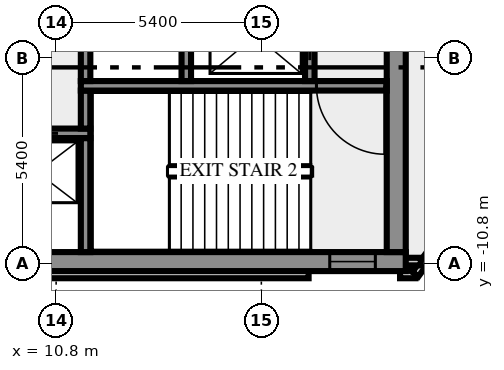
"""IFC4 building model, lengths in metres.
Left out: names, types, materials, properties, quantities, classifications, styles, units other than length and angle.
Written with IfcOpenShell. Run it as: python <this file> out.ifc"""

import sys

from ifc_helpers import new_model, si_unit, direction, frame, frame_2d, origin, place, context, subcontext, project, spatial, rectangle, extrude, element, fill, save


model = new_model("IFC4")
c1 = context("Model", 3, precision=1e-05, world=origin(), true_north=direction((0.0, 1.0)))
c2 = subcontext(c1, "Body", "Model", "MODEL_VIEW")
j1 = project(units=[si_unit("LENGTHUNIT", "METRE"), si_unit("PLANEANGLEUNIT", "RADIAN")], contexts=[c1])
p1 = place(None, origin())
s1 = spatial("IfcSite", under=j1, at=p1, CompositionType="ELEMENT")
p2 = place(p1, origin())
s2 = spatial("IfcBuilding", under=s1, at=p2, CompositionType="ELEMENT")
p3 = place(p2, frame((0.0, 0.0, 198.0)))
s3 = spatial("IfcBuildingStorey", under=s2, at=p3, CompositionType="ELEMENT", Elevation=198.0)
p4 = place(p3, frame((-17.444, -11.088, 0.0), z_axis=(0.0, 0.0, 1.0), x_axis=(1.0, 0.0, 0.0)))
e1 = element("IfcWall", 1, at=p4, inside=s3, PredefinedType="SOLIDWALL", context=c2, shape_type="SweptSolid", body=[
    extrude(rectangle(XDim=34.888, YDim=0.2, at=frame_2d((17.444, 0.0))), origin(), (0.0, 0.0, 1.0), 3.65),
])
p5 = place(p3, frame((19.85, -11.088, 0.0), z_axis=(0.0, 0.0, 1.0), x_axis=(1.0, 0.0, 0.0)))
e2 = element("IfcWall", 2, at=p5, inside=s3, PredefinedType="SOLIDWALL", context=c2, shape_type="SweptSolid", body=[
    extrude(rectangle(XDim=0.406, YDim=0.2, at=frame_2d((0.203, 0.0))), origin(), (0.0, 0.0, 1.0), 3.65),
])
p6 = place(p3, frame((20.253, -11.083, 0.0), z_axis=(0.0, 0.0, 1.0), x_axis=(0.587766567315, 0.809030569476, 0.0)))
e3 = element("IfcWall", 3, at=p6, inside=s3, PredefinedType="SOLIDWALL", context=c2, shape_type="SweptSolid", body=[
    extrude(rectangle(XDim=2.688, YDim=0.2, at=frame_2d((1.344, 0.0))), origin(), (0.0, 0.0, 1.0), 3.65),
])
p7 = place(p3, frame((19.98, -10.75, 0.0), z_axis=(0.0, 0.0, 1.0), x_axis=(1.0, 0.0, 0.0)))
e4 = element("IfcWall", 4, at=p7, inside=s3, PredefinedType="SOLIDWALL", context=c2, shape_type="SweptSolid", body=[
    extrude(rectangle(XDim=0.417, YDim=0.2, at=frame_2d((0.208, 0.0))), origin(), (0.0, 0.0, 1.0), 3.65),
])
p8 = place(p3, frame((-20.0, -10.75, 0.0), z_axis=(0.0, 0.0, 1.0), x_axis=(1.0, 0.0, 0.0)))
e5 = element("IfcWall", 5, at=p8, inside=s3, PredefinedType="SHEAR", context=c2, shape_type="SweptSolid", body=[
    extrude(rectangle(XDim=40.0, YDim=0.5, at=frame_2d((20.0, 0.0))), origin(), (0.0, 0.0, 1.0), 3.65),
])
p9 = place(p8, frame((0.8, 0.0, 1.0)))
e6 = element("IfcOpeningElement", 6, at=p9, cuts=e5, PredefinedType="OPENING", context=c2, shape_type="SweptSolid", body=[
    extrude(rectangle(XDim=1.2, YDim=1.2, at=frame_2d((0.6, 0.6))), frame((0.0, 0.26, 0.0), z_axis=(0.0, -1.0, 0.0), x_axis=(1.0, 0.0, 0.0)), (0.0, 0.0, 1.0), 0.52),
])
p10 = place(p8, frame((38.0, 0.0, 1.0)))
e7 = element("IfcOpeningElement", 7, at=p10, cuts=e5, PredefinedType="OPENING", context=c2, shape_type="SweptSolid", body=[
    extrude(rectangle(XDim=1.2, YDim=1.2, at=frame_2d((0.6, 0.6))), frame((0.0, 0.26, 0.0), z_axis=(0.0, -1.0, 0.0), x_axis=(1.0, 0.0, 0.0)), (0.0, 0.0, 1.0), 0.52),
])
p11 = place(p3, frame((11.575, -10.5, 0.0), z_axis=(0.0, 0.0, 1.0), x_axis=(0.0, 1.0, 0.0)))
e8 = element("IfcWall", 8, at=p11, inside=s3, PredefinedType="SHEAR", context=c2, shape_type="SweptSolid", body=[
    extrude(rectangle(XDim=3.0, YDim=0.25, at=frame_2d((1.5, 0.0))), origin(), (0.0, 0.0, 1.0), 3.65),
])
p12 = place(p3, frame((19.75, -10.5, 0.0), z_axis=(0.0, 0.0, 1.0), x_axis=(0.0, 1.0, 0.0)))
e9 = element("IfcWall", 9, at=p12, inside=s3, PredefinedType="SHEAR", context=c2, shape_type="SweptSolid", body=[
    extrude(rectangle(XDim=8.8, YDim=0.5, at=frame_2d((4.4, 0.0))), origin(), (0.0, 0.0, 1.0), 3.65),
])
p13 = place(p3, frame((11.7, -7.375, 0.0), z_axis=(0.0, 0.0, 1.0), x_axis=(-1.0, 0.0, 0.0)))
e10 = element("IfcWall", 10, at=p13, inside=s3, PredefinedType="SHEAR", context=c2, shape_type="SweptSolid", body=[
    extrude(rectangle(XDim=23.4, YDim=0.25, at=frame_2d((11.7, 0.0))), origin(), (0.0, 0.0, 1.0), 3.65),
])
p14 = place(p13, frame((22.012, 0.0, 0.0)))
e11 = element("IfcOpeningElement", 11, at=p14, cuts=e10, PredefinedType="OPENING", context=c2, shape_type="SweptSolid", body=[
    extrude(rectangle(XDim=0.9, YDim=2.1, at=frame_2d((0.45, 1.05))), frame((0.0, 0.135, 0.0), z_axis=(0.0, -1.0, 0.0), x_axis=(1.0, 0.0, 0.0)), (0.0, 0.0, 1.0), 0.27),
])
p15 = place(p13, frame((20.25, 0.0, 0.0)))
e12 = element("IfcOpeningElement", 12, at=p15, cuts=e10, PredefinedType="OPENING", context=c2, shape_type="SweptSolid", body=[
    extrude(rectangle(XDim=0.9, YDim=2.1, at=frame_2d((0.45, 1.05))), frame((0.0, 0.135, 0.0), z_axis=(0.0, -1.0, 0.0), x_axis=(1.0, 0.0, 0.0)), (0.0, 0.0, 1.0), 0.27),
])
p16 = place(p13, frame((18.25, 0.0, 0.0)))
e13 = element("IfcOpeningElement", 13, at=p16, cuts=e10, PredefinedType="OPENING", context=c2, shape_type="SweptSolid", body=[
    extrude(rectangle(XDim=0.9, YDim=2.1, at=frame_2d((0.45, 1.05))), frame((0.0, 0.135, 0.0), z_axis=(0.0, -1.0, 0.0), x_axis=(1.0, 0.0, 0.0)), (0.0, 0.0, 1.0), 0.27),
])
p17 = place(p13, frame((16.287, 0.0, 0.0)))
e14 = element("IfcOpeningElement", 14, at=p17, cuts=e10, PredefinedType="OPENING", context=c2, shape_type="SweptSolid", body=[
    extrude(rectangle(XDim=0.9, YDim=2.1, at=frame_2d((0.45, 1.05))), frame((0.0, 0.135, 0.0), z_axis=(0.0, -1.0, 0.0), x_axis=(1.0, 0.0, 0.0)), (0.0, 0.0, 1.0), 0.27),
])
p18 = place(p13, frame((14.25, 0.0, 0.0)))
e15 = element("IfcOpeningElement", 15, at=p18, cuts=e10, PredefinedType="OPENING", context=c2, shape_type="SweptSolid", body=[
    extrude(rectangle(XDim=0.9, YDim=2.1, at=frame_2d((0.45, 1.05))), frame((0.0, 0.135, 0.0), z_axis=(0.0, -1.0, 0.0), x_axis=(1.0, 0.0, 0.0)), (0.0, 0.0, 1.0), 0.27),
])
p19 = place(p13, frame((12.125, 0.0, 0.0)))
e16 = element("IfcOpeningElement", 16, at=p19, cuts=e10, PredefinedType="OPENING", context=c2, shape_type="SweptSolid", body=[
    extrude(rectangle(XDim=0.9, YDim=2.1, at=frame_2d((0.45, 1.05))), frame((0.0, 0.135, 0.0), z_axis=(0.0, -1.0, 0.0), x_axis=(1.0, 0.0, 0.0)), (0.0, 0.0, 1.0), 0.27),
])
p20 = place(p13, frame((10.45, 0.0, 0.0)))
e17 = element("IfcOpeningElement", 17, at=p20, cuts=e10, PredefinedType="OPENING", context=c2, shape_type="SweptSolid", body=[
    extrude(rectangle(XDim=0.75, YDim=2.1, at=frame_2d((0.375, 1.05))), frame((0.0, 0.135, 0.0), z_axis=(0.0, -1.0, 0.0), x_axis=(1.0, 0.0, 0.0)), (0.0, 0.0, 1.0), 0.27),
])
p21 = place(p13, frame((8.35, 0.0, 0.0)))
e18 = element("IfcOpeningElement", 18, at=p21, cuts=e10, PredefinedType="OPENING", context=c2, shape_type="SweptSolid", body=[
    extrude(rectangle(XDim=1.1, YDim=2.1, at=frame_2d((0.55, 1.05))), frame((0.0, 0.135, 0.0), z_axis=(0.0, -1.0, 0.0), x_axis=(1.0, 0.0, 0.0)), (0.0, 0.0, 1.0), 0.27),
])
p22 = place(p13, frame((5.85, 0.0, 0.0)))
e19 = element("IfcOpeningElement", 19, at=p22, cuts=e10, PredefinedType="OPENING", context=c2, shape_type="SweptSolid", body=[
    extrude(rectangle(XDim=1.1, YDim=2.1, at=frame_2d((0.55, 1.05))), frame((0.0, 0.135, 0.0), z_axis=(0.0, -1.0, 0.0), x_axis=(1.0, 0.0, 0.0)), (0.0, 0.0, 1.0), 0.27),
])
p23 = place(p13, frame((3.35, 0.0, 0.0)))
e20 = element("IfcOpeningElement", 20, at=p23, cuts=e10, PredefinedType="OPENING", context=c2, shape_type="SweptSolid", body=[
    extrude(rectangle(XDim=1.1, YDim=2.1, at=frame_2d((0.55, 1.05))), frame((0.0, 0.135, 0.0), z_axis=(0.0, -1.0, 0.0), x_axis=(1.0, 0.0, 0.0)), (0.0, 0.0, 1.0), 0.27),
])
p24 = place(p13, frame((0.85, 0.0, 0.0)))
e21 = element("IfcOpeningElement", 21, at=p24, cuts=e10, PredefinedType="OPENING", context=c2, shape_type="SweptSolid", body=[
    extrude(rectangle(XDim=1.1, YDim=2.1, at=frame_2d((0.55, 1.05))), frame((0.0, 0.135, 0.0), z_axis=(0.0, -1.0, 0.0), x_axis=(1.0, 0.0, 0.0)), (0.0, 0.0, 1.0), 0.27),
])
p25 = place(p3, frame((11.575, -7.25, 0.0), z_axis=(0.0, 0.0, 1.0), x_axis=(0.0, 1.0, 0.0)))
e22 = element("IfcWall", 22, at=p25, inside=s3, PredefinedType="SHEAR", context=c2, shape_type="SweptSolid", body=[
    extrude(rectangle(XDim=1.0, YDim=0.25, at=frame_2d((0.5, 0.0))), origin(), (0.0, 0.0, 1.0), 3.65),
])
p26 = place(p3, frame((19.5, -6.125, 0.0), z_axis=(0.0, 0.0, 1.0), x_axis=(-1.0, 0.0, 0.0)))
e23 = element("IfcWall", 23, at=p26, inside=s3, PredefinedType="SHEAR", context=c2, shape_type="SweptSolid", body=[
    extrude(rectangle(XDim=8.05, YDim=0.25, at=frame_2d((4.025, 0.0))), origin(), (0.0, 0.0, 1.0), 3.65),
])
p27 = place(p26, frame((0.05, 0.0, 0.0)))
e24 = element("IfcOpeningElement", 24, at=p27, cuts=e23, PredefinedType="OPENING", context=c2, shape_type="SweptSolid", body=[
    extrude(rectangle(XDim=1.8, YDim=2.1, at=frame_2d((0.9, 1.05))), frame((0.0, 0.135, 0.0), z_axis=(0.0, -1.0, 0.0), x_axis=(1.0, 0.0, 0.0)), (0.0, 0.0, 1.0), 0.27),
])
p28 = place(p3, frame((11.575, -6.0, 0.0), z_axis=(0.0, 0.0, 1.0), x_axis=(0.0, 1.0, 0.0)))
e25 = element("IfcWall", 25, at=p28, inside=s3, PredefinedType="SHEAR", context=c2, shape_type="SweptSolid", body=[
    extrude(rectangle(XDim=1.75, YDim=0.25, at=frame_2d((0.875, 0.0))), origin(), (0.0, 0.0, 1.0), 3.65),
])
p29 = place(p3, frame((14.225, -6.0, 0.0), z_axis=(0.0, 0.0, 1.0), x_axis=(0.0, 1.0, 0.0)))
e26 = element("IfcWall", 26, at=p29, inside=s3, PredefinedType="SHEAR", context=c2, shape_type="SweptSolid", body=[
    extrude(rectangle(XDim=4.3, YDim=0.25, at=frame_2d((2.15, 0.0))), origin(), (0.0, 0.0, 1.0), 3.65),
])
p30 = place(p3, frame((17.475, -6.0, 0.0), z_axis=(0.0, 0.0, 1.0), x_axis=(0.0, 1.0, 0.0)))
e27 = element("IfcWall", 27, at=p30, inside=s3, PredefinedType="SHEAR", context=c2, shape_type="SweptSolid", body=[
    extrude(rectangle(XDim=4.3, YDim=0.25, at=frame_2d((2.15, 0.0))), origin(), (0.0, 0.0, 1.0), 3.65),
])
p31 = place(p30, frame((0.55, 0.0, 0.0)))
e28 = element("IfcOpeningElement", 28, at=p31, cuts=e27, PredefinedType="OPENING", context=c2, shape_type="SweptSolid", body=[
    extrude(rectangle(XDim=1.3, YDim=2.1, at=frame_2d((0.65, 1.05))), frame((0.0, 0.135, 0.0), z_axis=(0.0, -1.0, 0.0), x_axis=(1.0, 0.0, 0.0)), (0.0, 0.0, 1.0), 0.27),
])
p32 = place(p10, origin())
e29 = element("IfcWindow", 29, at=p32, inside=s3, PartitioningType="SINGLE_PANEL", PredefinedType="WINDOW", context=c2, shape_type="SweptSolid", body=[
    extrude(rectangle(XDim=1.2, YDim=1.2, at=frame_2d((0.6, 0.6))), frame((0.0, 0.03, 0.0), z_axis=(0.0, -1.0, 0.0), x_axis=(1.0, 0.0, 0.0)), (0.0, 0.0, 1.0), 0.06),
])
fill(e7, e29)
p33 = place(p24, origin())
e30 = element("IfcDoor", 30, at=p33, inside=s3, OperationType="DOUBLE_DOOR_SLIDING", PredefinedType="DOOR", context=c2, shape_type="SweptSolid", body=[
    extrude(rectangle(XDim=1.1, YDim=2.1, at=frame_2d((0.55, 1.05))), frame((0.0, 0.025, 0.0), z_axis=(0.0, -1.0, 0.0), x_axis=(1.0, 0.0, 0.0)), (0.0, 0.0, 1.0), 0.05),
])
fill(e21, e30)
p34 = place(p27, origin())
e31 = element("IfcDoor", 31, at=p34, inside=s3, OperationType="DOUBLE_DOOR_SINGLE_SWING", PredefinedType="DOOR", context=c2, shape_type="SweptSolid", body=[
    extrude(rectangle(XDim=1.8, YDim=2.1, at=frame_2d((0.9, 1.05))), frame((0.0, 0.025, 0.0), z_axis=(0.0, -1.0, 0.0), x_axis=(1.0, 0.0, 0.0)), (0.0, 0.0, 1.0), 0.05),
])
fill(e24, e31)
p35 = place(p31, origin())
e32 = element("IfcDoor", 32, at=p35, inside=s3, OperationType="DOUBLE_DOOR_SLIDING", PredefinedType="DOOR", context=c2, shape_type="SweptSolid", body=[
    extrude(rectangle(XDim=1.3, YDim=2.1, at=frame_2d((0.65, 1.05))), frame((0.0, 0.025, 0.0), z_axis=(0.0, -1.0, 0.0), x_axis=(1.0, 0.0, 0.0)), (0.0, 0.0, 1.0), 0.05),
])
fill(e28, e32)
save(model, sys.argv[1])
